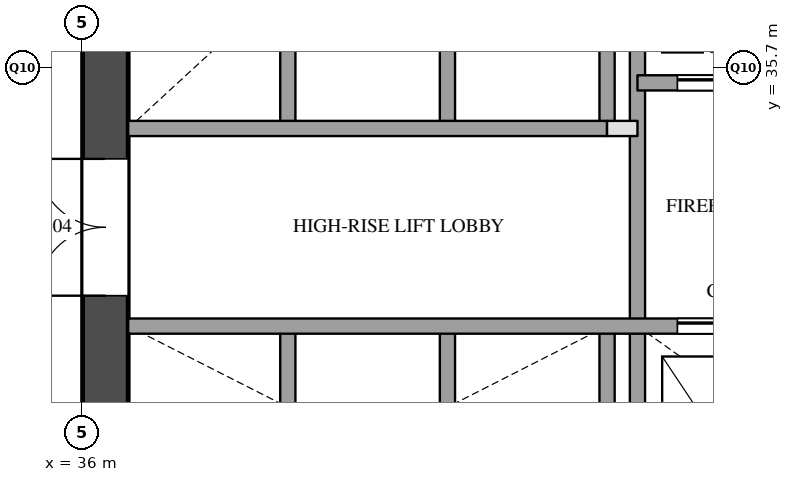
"""IFC4 building model, lengths in metres.
Left out: names, types, materials, properties, quantities, classifications, styles, units other than length and angle.
Written with IfcOpenShell. Run it as: python <this file> out.ifc"""

import sys

from ifc_helpers import new_model, si_unit, direction, frame, frame_2d, origin, place, context, subcontext, project, spatial, rectangle, extrude, element, fill, save


model = new_model("IFC4")
c1 = context("Model", 3, precision=1e-05, world=origin(), true_north=direction((0.0, 1.0)))
c2 = subcontext(c1, "Body", "Model", "MODEL_VIEW")
j1 = project(units=[si_unit("LENGTHUNIT", "METRE"), si_unit("PLANEANGLEUNIT", "RADIAN")], contexts=[c1])
p1 = place(None, origin())
s1 = spatial("IfcSite", under=j1, at=p1, CompositionType="ELEMENT")
p2 = place(p1, origin())
s2 = spatial("IfcBuilding", under=s1, at=p2, CompositionType="ELEMENT")
p3 = place(p2, frame((0.0, 0.0, 42.4)))
s3 = spatial("IfcBuildingStorey", under=s2, at=p3, CompositionType="ELEMENT", Elevation=42.4)
p4 = place(p3, frame((36.3, 29.1, 0.0), z_axis=(0.0, 0.0, 1.0), x_axis=(0.0, 1.0, 0.0)))
e1 = element("IfcWall", 1, at=p4, inside=s3, PredefinedType="SHEAR", context=c2, shape_type="SweptSolid", body=[
    extrude(rectangle(XDim=20.3, YDim=0.6, at=frame_2d((10.15, 0.0))), origin(), (0.0, 0.0, 1.0), 3.5),
])
p5 = place(p4, frame((3.6, 0.0, 0.0)))
e2 = element("IfcOpeningElement", 2, at=p5, cuts=e1, PredefinedType="OPENING", context=c2, shape_type="SweptSolid", body=[
    extrude(rectangle(XDim=1.8, YDim=2.1, at=frame_2d((0.9, 1.05))), frame((0.0, 0.31, 0.0), z_axis=(0.0, -1.0, 0.0), x_axis=(1.0, 0.0, 0.0)), (0.0, 0.0, 1.0), 0.62),
])
p6 = place(p4, frame((16.4, 0.0, 0.0)))
e3 = element("IfcOpeningElement", 3, at=p6, cuts=e1, PredefinedType="OPENING", context=c2, shape_type="SweptSolid", body=[
    extrude(rectangle(XDim=1.0, YDim=2.1, at=frame_2d((0.5, 1.05))), frame((0.0, 0.31, 0.0), z_axis=(0.0, -1.0, 0.0), x_axis=(1.0, 0.0, 0.0)), (0.0, 0.0, 1.0), 0.62),
])
p7 = place(p3, frame((38.7, 29.1, 0.0), z_axis=(0.0, 0.0, 1.0), x_axis=(0.0, 1.0, 0.0)))
e4 = element("IfcWall", 4, at=p7, inside=s3, PredefinedType="SOLIDWALL", context=c2, shape_type="SweptSolid", body=[
    extrude(rectangle(XDim=3.2, YDim=0.2, at=frame_2d((1.6, 0.0))), origin(), (0.0, 0.0, 1.0), 3.5),
])
p8 = place(p3, frame((38.7, 34.9, 0.0), z_axis=(0.0, 0.0, 1.0), x_axis=(0.0, 1.0, 0.0)))
e5 = element("IfcWall", 5, at=p8, inside=s3, PredefinedType="SOLIDWALL", context=c2, shape_type="SweptSolid", body=[
    extrude(rectangle(XDim=3.2, YDim=0.2, at=frame_2d((1.6, 0.0))), origin(), (0.0, 0.0, 1.0), 3.5),
])
p9 = place(p3, frame((40.8, 29.1, 0.0), z_axis=(0.0, 0.0, 1.0), x_axis=(0.0, 1.0, 0.0)))
e6 = element("IfcWall", 6, at=p9, inside=s3, PredefinedType="SOLIDWALL", context=c2, shape_type="SweptSolid", body=[
    extrude(rectangle(XDim=3.2, YDim=0.2, at=frame_2d((1.6, 0.0))), origin(), (0.0, 0.0, 1.0), 3.5),
])
p10 = place(p3, frame((40.8, 34.9, 0.0), z_axis=(0.0, 0.0, 1.0), x_axis=(0.0, 1.0, 0.0)))
e7 = element("IfcWall", 7, at=p10, inside=s3, PredefinedType="SOLIDWALL", context=c2, shape_type="SweptSolid", body=[
    extrude(rectangle(XDim=3.2, YDim=0.2, at=frame_2d((1.6, 0.0))), origin(), (0.0, 0.0, 1.0), 3.5),
])
p11 = place(p3, frame((42.9, 29.1, 0.0), z_axis=(0.0, 0.0, 1.0), x_axis=(0.0, 1.0, 0.0)))
e8 = element("IfcWall", 8, at=p11, inside=s3, PredefinedType="SOLIDWALL", context=c2, shape_type="SweptSolid", body=[
    extrude(rectangle(XDim=3.2, YDim=0.2, at=frame_2d((1.6, 0.0))), origin(), (0.0, 0.0, 1.0), 3.5),
])
p12 = place(p3, frame((42.9, 34.9, 0.0), z_axis=(0.0, 0.0, 1.0), x_axis=(0.0, 1.0, 0.0)))
e9 = element("IfcWall", 9, at=p12, inside=s3, PredefinedType="SOLIDWALL", context=c2, shape_type="SweptSolid", body=[
    extrude(rectangle(XDim=3.2, YDim=0.2, at=frame_2d((1.6, 0.0))), origin(), (0.0, 0.0, 1.0), 3.5),
])
p13 = place(p3, frame((43.3, 29.1, 0.0), z_axis=(0.0, 0.0, 1.0), x_axis=(0.0, 1.0, 0.0)))
e10 = element("IfcWall", 10, at=p13, inside=s3, PredefinedType="SOLIDWALL", context=c2, shape_type="SweptSolid", body=[
    extrude(rectangle(XDim=9.9, YDim=0.2, at=frame_2d((4.95, 0.0))), origin(), (0.0, 0.0, 1.0), 3.5),
])
p14 = place(p3, frame((36.6, 32.3, 0.0), z_axis=(0.0, 0.0, 1.0), x_axis=(1.0, 0.0, 0.0)))
e11 = element("IfcWall", 11, at=p14, inside=s3, PredefinedType="SOLIDWALL", context=c2, shape_type="SweptSolid", body=[
    extrude(rectangle(XDim=11.2, YDim=0.2, at=frame_2d((5.6, 0.0))), origin(), (0.0, 0.0, 1.0), 3.5),
])
p15 = place(p14, frame((7.225, 0.0, 0.0)))
e12 = element("IfcOpeningElement", 12, at=p15, cuts=e11, PredefinedType="OPENING", context=c2, shape_type="SweptSolid", body=[
    extrude(rectangle(XDim=1.2, YDim=2.1, at=frame_2d((0.6, 1.05))), frame((0.0, 0.11, 0.0), z_axis=(0.0, -1.0, 0.0), x_axis=(1.0, 0.0, 0.0)), (0.0, 0.0, 1.0), 0.22),
])
p16 = place(p14, frame((9.475, 0.0, 0.0)))
e13 = element("IfcOpeningElement", 13, at=p16, cuts=e11, PredefinedType="OPENING", context=c2, shape_type="SweptSolid", body=[
    extrude(rectangle(XDim=1.2, YDim=2.1, at=frame_2d((0.6, 1.05))), frame((0.0, 0.11, 0.0), z_axis=(0.0, -1.0, 0.0), x_axis=(1.0, 0.0, 0.0)), (0.0, 0.0, 1.0), 0.22),
])
p17 = place(p3, frame((42.9, 34.9, 0.0), z_axis=(0.0, 0.0, 1.0), x_axis=(1.0, 0.0, 0.0)))
e14 = element("IfcWall", 14, at=p17, inside=s3, PredefinedType="PARTITIONING", context=c2, shape_type="SweptSolid", body=[
    extrude(rectangle(XDim=0.4, YDim=0.2, at=frame_2d((0.2, 0.0))), origin(), (0.0, 0.0, 1.0), 3.5),
])
p18 = place(p3, frame((36.6, 34.9, 0.0), z_axis=(0.0, 0.0, 1.0), x_axis=(1.0, 0.0, 0.0)))
e15 = element("IfcWall", 15, at=p18, inside=s3, PredefinedType="SOLIDWALL", context=c2, shape_type="SweptSolid", body=[
    extrude(rectangle(XDim=6.3, YDim=0.2, at=frame_2d((3.15, 0.0))), origin(), (0.0, 0.0, 1.0), 3.5),
])
p19 = place(p3, frame((43.3, 35.5, 0.0), z_axis=(0.0, 0.0, 1.0), x_axis=(1.0, 0.0, 0.0)))
e16 = element("IfcWall", 16, at=p19, inside=s3, PredefinedType="SOLIDWALL", context=c2, shape_type="SweptSolid", body=[
    extrude(rectangle(XDim=4.5, YDim=0.2, at=frame_2d((2.25, 0.0))), origin(), (0.0, 0.0, 1.0), 3.5),
])
p20 = place(p19, frame((0.525, 0.0, 0.0)))
e17 = element("IfcOpeningElement", 17, at=p20, cuts=e16, PredefinedType="OPENING", context=c2, shape_type="SweptSolid", body=[
    extrude(rectangle(XDim=1.2, YDim=2.1, at=frame_2d((0.6, 1.05))), frame((0.0, 0.11, 0.0), z_axis=(0.0, -1.0, 0.0), x_axis=(1.0, 0.0, 0.0)), (0.0, 0.0, 1.0), 0.22),
])
p21 = place(p19, frame((3.025, 0.0, 0.0)))
e18 = element("IfcOpeningElement", 18, at=p21, cuts=e16, PredefinedType="OPENING", context=c2, shape_type="SweptSolid", body=[
    extrude(rectangle(XDim=0.7, YDim=2.1, at=frame_2d((0.35, 1.05))), frame((0.0, 0.11, 0.0), z_axis=(0.0, -1.0, 0.0), x_axis=(1.0, 0.0, 0.0)), (0.0, 0.0, 1.0), 0.22),
])
p22 = place(p15, origin())
e19 = element("IfcDoor", 19, at=p22, inside=s3, OperationType="SLIDING_TO_LEFT", PredefinedType="DOOR", context=c2, shape_type="SweptSolid", body=[
    extrude(rectangle(XDim=1.2, YDim=2.1, at=frame_2d((0.6, 1.05))), frame((0.0, 0.025, 0.0), z_axis=(0.0, -1.0, 0.0), x_axis=(1.0, 0.0, 0.0)), (0.0, 0.0, 1.0), 0.05),
])
fill(e12, e19)
p23 = place(p20, origin())
e20 = element("IfcDoor", 20, at=p23, inside=s3, OperationType="SLIDING_TO_LEFT", PredefinedType="DOOR", context=c2, shape_type="SweptSolid", body=[
    extrude(rectangle(XDim=1.2, YDim=2.1, at=frame_2d((0.6, 1.05))), frame((0.0, 0.025, 0.0), z_axis=(0.0, -1.0, 0.0), x_axis=(1.0, 0.0, 0.0)), (0.0, 0.0, 1.0), 0.05),
])
fill(e17, e20)
p24 = place(p5, origin())
e21 = element("IfcDoor", 21, at=p24, inside=s3, OperationType="DOUBLE_DOOR_SINGLE_SWING", PredefinedType="DOOR", context=c2, shape_type="SweptSolid", body=[
    extrude(rectangle(XDim=1.8, YDim=2.1, at=frame_2d((0.9, 1.05))), frame((0.0, 0.025, 0.0), z_axis=(0.0, -1.0, 0.0), x_axis=(1.0, 0.0, 0.0)), (0.0, 0.0, 1.0), 0.05),
])
fill(e2, e21)
save(model, sys.argv[1])
